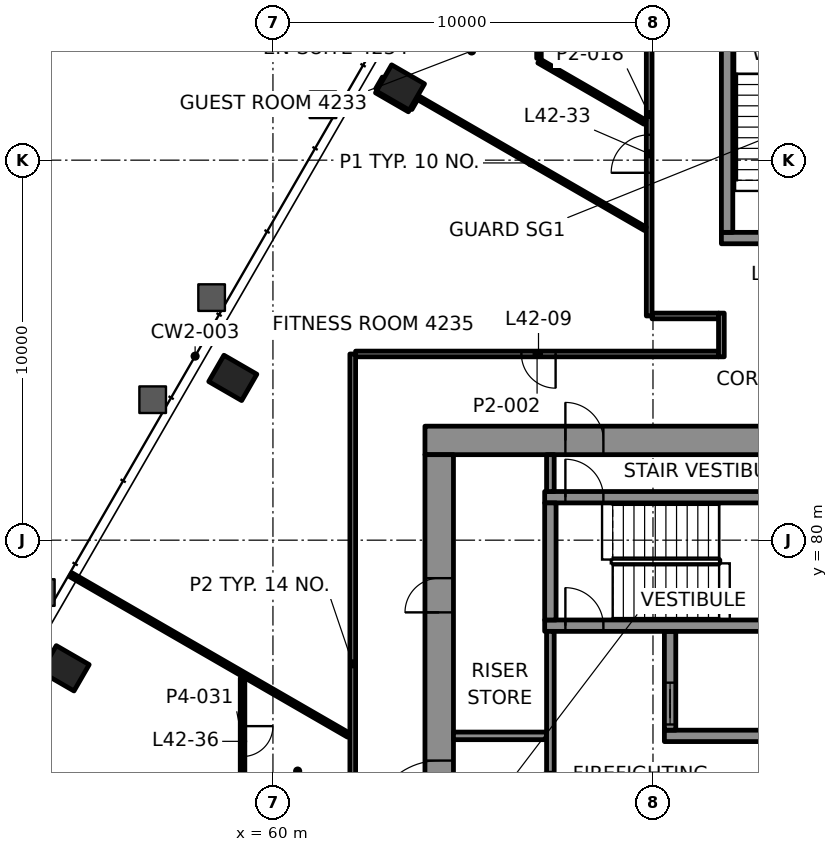
"""IFC4 building model, lengths in metres.
Left out: names, types, materials, properties, quantities, classifications, styles, units other than length and angle.
Written with IfcOpenShell. Run it as: python <this file> out.ifc"""

import sys

from ifc_helpers import new_model, si_unit, direction, frame, frame_2d, origin, origin_2d, place, context, subcontext, project, spatial, rectangle, hollow_rectangle, extrude, element, fill, save


model = new_model("IFC4")
c1 = context("Model", 3, precision=1e-05, world=origin(), true_north=direction((0.0, 1.0)))
c2 = subcontext(c1, "Body", "Model", "MODEL_VIEW")
j1 = project(units=[si_unit("LENGTHUNIT", "METRE"), si_unit("PLANEANGLEUNIT", "RADIAN")], contexts=[c1])
p1 = place(None, origin())
s1 = spatial("IfcSite", under=j1, at=p1, CompositionType="ELEMENT")
p2 = place(p1, origin())
s2 = spatial("IfcBuilding", under=s1, at=p2, CompositionType="ELEMENT")
p3 = place(p2, frame((0.0, 0.0, 183.1)))
s3 = spatial("IfcBuildingStorey", under=s2, at=p3, CompositionType="ELEMENT", Elevation=183.1)
for number, where, z_axis, x_axis in (
    (1, (63.355, 91.912, -0.0), (0.0, 0.0, 1.0), (-0.5, -0.866, 0.0)),
    (2, (58.944, 84.27, -0.0), (0.0, 0.0, 1.0), (-0.5, -0.866, 0.0)),
    (3, (54.532, 76.628, -0.0), (0.0, 0.0, 1.0), (-0.5, -0.866, 0.0)),
):
    element("IfcColumn", number, at=place(p3, frame(where, z_axis=z_axis, x_axis=x_axis)), inside=s3, PredefinedType="COLUMN", context=c2, shape_type="SweptSolid", body=[
        extrude(hollow_rectangle(XDim=0.8, YDim=1.0, WallThickness=0.05, at=origin_2d()), origin(), (0.0, 0.0, 1.0), 3.9),
    ])
p4 = place(p3, frame((64.0, 82.625, 0.0), z_axis=(0.0, 0.0, 1.0), x_axis=(1.0, 0.0, 0.0)))
e4 = element("IfcWall", 4, at=p4, inside=s3, PredefinedType="SHEAR", context=c2, shape_type="SweptSolid", body=[
    extrude(rectangle(XDim=22.0, YDim=0.75, at=frame_2d((11.0, 0.0))), origin(), (0.0, 0.0, 1.0), 3.7),
])
p5 = place(p4, frame((3.695, 0.0, 0.0)))
e5 = element("IfcOpeningElement", 5, at=p5, cuts=e4, PredefinedType="OPENING", context=c2, shape_type="SweptSolid", body=[
    extrude(rectangle(XDim=1.0, YDim=2.1, at=frame_2d((0.5, 1.05))), frame((0.0, 0.385, 0.0), z_axis=(0.0, -1.0, 0.0), x_axis=(1.0, 0.0, 0.0)), (0.0, 0.0, 1.0), 0.77),
])
p6 = place(p4, frame((17.505, 0.0, 0.0)))
e6 = element("IfcOpeningElement", 6, at=p6, cuts=e4, PredefinedType="OPENING", context=c2, shape_type="SweptSolid", body=[
    extrude(rectangle(XDim=1.0, YDim=2.1, at=frame_2d((0.5, 1.05))), frame((0.0, 0.385, 0.0), z_axis=(0.0, -1.0, 0.0), x_axis=(1.0, 0.0, 0.0)), (0.0, 0.0, 1.0), 0.77),
])
p7 = place(p4, frame((10.65, 0.0, 0.0)))
e7 = element("IfcOpeningElement", 7, at=p7, cuts=e4, PredefinedType="OPENING", context=c2, shape_type="SweptSolid", body=[
    extrude(rectangle(XDim=0.9, YDim=2.1, at=frame_2d((0.45, 1.05))), frame((0.0, 0.385, 0.0), z_axis=(0.0, -1.0, 0.0), x_axis=(1.0, 0.0, 0.0)), (0.0, 0.0, 1.0), 0.77),
])
p8 = place(p3, frame((64.375, 67.75, 0.0), z_axis=(0.0, 0.0, 1.0), x_axis=(0.0, 1.0, 0.0)))
e8 = element("IfcWall", 8, at=p8, inside=s3, PredefinedType="SHEAR", context=c2, shape_type="SweptSolid", body=[
    extrude(rectangle(XDim=14.5, YDim=0.75, at=frame_2d((7.25, 0.0))), origin(), (0.0, 0.0, 1.0), 3.7),
])
p9 = place(p8, frame((4.65, 0.0, 0.0)))
e9 = element("IfcOpeningElement", 9, at=p9, cuts=e8, PredefinedType="OPENING", context=c2, shape_type="SweptSolid", body=[
    extrude(rectangle(XDim=1.8, YDim=2.1, at=frame_2d((0.9, 1.05))), frame((0.0, 0.385, 0.0), z_axis=(0.0, -1.0, 0.0), x_axis=(1.0, 0.0, 0.0)), (0.0, 0.0, 1.0), 0.77),
])
p10 = place(p8, frame((2.55, 0.0, 0.0)))
e10 = element("IfcOpeningElement", 10, at=p10, cuts=e8, PredefinedType="OPENING", context=c2, shape_type="SweptSolid", body=[
    extrude(rectangle(XDim=0.9, YDim=2.1, at=frame_2d((0.45, 1.05))), frame((0.0, 0.385, 0.0), z_axis=(0.0, -1.0, 0.0), x_axis=(1.0, 0.0, 0.0)), (0.0, 0.0, 1.0), 0.77),
])
p11 = place(p8, frame((10.35, 0.0, 0.0)))
e11 = element("IfcOpeningElement", 11, at=p11, cuts=e8, PredefinedType="OPENING", context=c2, shape_type="SweptSolid", body=[
    extrude(rectangle(XDim=0.9, YDim=2.1, at=frame_2d((0.45, 1.05))), frame((0.0, 0.385, 0.0), z_axis=(0.0, -1.0, 0.0), x_axis=(1.0, 0.0, 0.0)), (0.0, 0.0, 1.0), 0.77),
])
p12 = place(p3, frame((70.3, 74.85, 0.0), z_axis=(0.0, 0.0, 1.0), x_axis=(1.0, 0.0, 0.0)))
e12 = element("IfcWall", 12, at=p12, inside=s3, PredefinedType="SHEAR", context=c2, shape_type="SweptSolid", body=[
    extrude(rectangle(XDim=14.3, YDim=0.3, at=frame_2d((7.15, 0.0))), origin(), (0.0, 0.0, 1.0), 3.7),
])
p13 = place(p12, frame((3.8, 0.0, 0.0)))
e13 = element("IfcOpeningElement", 13, at=p13, cuts=e12, PredefinedType="OPENING", context=c2, shape_type="SweptSolid", body=[
    extrude(rectangle(XDim=1.1, YDim=2.1, at=frame_2d((0.55, 1.05))), frame((0.0, 0.16, 0.0), z_axis=(0.0, -1.0, 0.0), x_axis=(1.0, 0.0, 0.0)), (0.0, 0.0, 1.0), 0.32),
])
p14 = place(p12, frame((12.2, 0.0, 0.0)))
e14 = element("IfcOpeningElement", 14, at=p14, cuts=e12, PredefinedType="OPENING", context=c2, shape_type="SweptSolid", body=[
    extrude(rectangle(XDim=1.1, YDim=2.1, at=frame_2d((0.55, 1.05))), frame((0.0, 0.16, 0.0), z_axis=(0.0, -1.0, 0.0), x_axis=(1.0, 0.0, 0.0)), (0.0, 0.0, 1.0), 0.32),
])
p15 = place(p3, frame((70.45, 75.0, 0.0), z_axis=(0.0, 0.0, 1.0), x_axis=(0.0, 1.0, 0.0)))
e15 = element("IfcWall", 15, at=p15, inside=s3, PredefinedType="SHEAR", context=c2, shape_type="SweptSolid", body=[
    extrude(rectangle(XDim=2.6, YDim=0.3, at=frame_2d((1.3, 0.0))), origin(), (0.0, 0.0, 1.0), 3.7),
])
p16 = place(p15, frame((0.15, 0.0, 0.0)))
e16 = element("IfcOpeningElement", 16, at=p16, cuts=e15, PredefinedType="OPENING", context=c2, shape_type="SweptSolid", body=[
    extrude(rectangle(XDim=1.1, YDim=2.1, at=frame_2d((0.55, 1.05))), frame((0.0, 0.16, 0.0), z_axis=(0.0, -1.0, 0.0), x_axis=(1.0, 0.0, 0.0)), (0.0, 0.0, 1.0), 0.32),
])
p17 = place(p3, frame((67.15, 77.75, 0.0), z_axis=(0.0, 0.0, 1.0), x_axis=(1.0, 0.0, 0.0)))
e17 = element("IfcWall", 17, at=p17, inside=s3, PredefinedType="SHEAR", context=c2, shape_type="SweptSolid", body=[
    extrude(rectangle(XDim=17.45, YDim=0.3, at=frame_2d((8.725, 0.0))), origin(), (0.0, 0.0, 1.0), 3.7),
])
p18 = place(p17, frame((0.545, 0.0, 0.0)))
e18 = element("IfcOpeningElement", 18, at=p18, cuts=e17, PredefinedType="OPENING", context=c2, shape_type="SweptSolid", body=[
    extrude(rectangle(XDim=1.0, YDim=2.1, at=frame_2d((0.5, 1.05))), frame((0.0, 0.16, 0.0), z_axis=(0.0, -1.0, 0.0), x_axis=(1.0, 0.0, 0.0)), (0.0, 0.0, 1.0), 0.32),
])
p19 = place(p3, frame((67.15, 81.13, 0.0), z_axis=(0.0, 0.0, 1.0), x_axis=(1.0, 0.0, 0.0)))
e19 = element("IfcWall", 19, at=p19, inside=s3, PredefinedType="SHEAR", context=c2, shape_type="SweptSolid", body=[
    extrude(rectangle(XDim=6.91, YDim=0.3, at=frame_2d((3.455, 0.0))), origin(), (0.0, 0.0, 1.0), 3.7),
])
p20 = place(p19, frame((0.545, 0.0, 0.0)))
e20 = element("IfcOpeningElement", 20, at=p20, cuts=e19, PredefinedType="OPENING", context=c2, shape_type="SweptSolid", body=[
    extrude(rectangle(XDim=1.0, YDim=2.1, at=frame_2d((0.5, 1.05))), frame((0.0, 0.16, 0.0), z_axis=(0.0, -1.0, 0.0), x_axis=(1.0, 0.0, 0.0)), (0.0, 0.0, 1.0), 0.32),
])
p21 = place(p3, frame((67.3, 77.9, 0.0), z_axis=(0.0, 0.0, 1.0), x_axis=(0.0, 1.0, 0.0)))
e21 = element("IfcWall", 21, at=p21, inside=s3, PredefinedType="SHEAR", context=c2, shape_type="SweptSolid", body=[
    extrude(rectangle(XDim=3.08, YDim=0.3, at=frame_2d((1.54, 0.0))), origin(), (0.0, 0.0, 1.0), 3.7),
])
p22 = place(p3, frame((71.8, 87.95, 0.0), z_axis=(0.0, 0.0, 1.0), x_axis=(1.0, 0.0, 0.0)))
e22 = element("IfcWall", 22, at=p22, inside=s3, PredefinedType="SHEAR", context=c2, shape_type="SweptSolid", body=[
    extrude(rectangle(XDim=6.4, YDim=0.3, at=frame_2d((3.2, 0.0))), origin(), (0.0, 0.0, 1.0), 3.7),
])
p23 = place(p22, frame((1.325, 0.0, 0.0)))
e23 = element("IfcOpeningElement", 23, at=p23, cuts=e22, PredefinedType="OPENING", context=c2, shape_type="SweptSolid", body=[
    extrude(rectangle(XDim=1.0, YDim=2.1, at=frame_2d((0.5, 1.05))), frame((0.0, 0.16, 0.0), z_axis=(0.0, -1.0, 0.0), x_axis=(1.0, 0.0, 0.0)), (0.0, 0.0, 1.0), 0.32),
])
p24 = place(p22, frame((4.125, 0.0, 0.0)))
e24 = element("IfcOpeningElement", 24, at=p24, cuts=e22, PredefinedType="OPENING", context=c2, shape_type="SweptSolid", body=[
    extrude(rectangle(XDim=1.2, YDim=2.1, at=frame_2d((0.6, 1.05))), frame((0.0, 0.16, 0.0), z_axis=(0.0, -1.0, 0.0), x_axis=(1.0, 0.0, 0.0)), (0.0, 0.0, 1.0), 0.32),
])
p25 = place(p3, frame((71.95, 88.1, 0.0), z_axis=(0.0, 0.0, 1.0), x_axis=(0.0, 1.0, 0.0)))
e25 = element("IfcWall", 25, at=p25, inside=s3, PredefinedType="SHEAR", context=c2, shape_type="SweptSolid", body=[
    extrude(rectangle(XDim=6.2, YDim=0.3, at=frame_2d((3.1, 0.0))), origin(), (0.0, 0.0, 1.0), 3.7),
])
p26 = place(p3, frame((71.725, 84.9, 0.0), z_axis=(0.0, 0.0, 1.0), x_axis=(-1.0, 0.0, 0.0)))
e26 = element("IfcWall", 26, at=p26, inside=s3, PredefinedType="PARTITIONING", context=c2, shape_type="SweptSolid", body=[
    extrude(rectangle(XDim=9.55, YDim=0.15, at=frame_2d((4.775, 0.0))), origin(), (0.0, 0.0, 1.0), 3.1),
])
p27 = place(p26, frame((4.287, 0.0, 0.0)))
e27 = element("IfcOpeningElement", 27, at=p27, cuts=e26, PredefinedType="OPENING", context=c2, shape_type="SweptSolid", body=[
    extrude(rectangle(XDim=0.9, YDim=2.1, at=frame_2d((0.45, 1.05))), frame((0.0, 0.085, 0.0), z_axis=(0.0, -1.0, 0.0), x_axis=(1.0, 0.0, 0.0)), (0.0, 0.0, 1.0), 0.17),
])
p28 = place(p3, frame((69.976, 85.9, 0.0), z_axis=(0.0, 0.0, 1.0), x_axis=(1.0, 0.0, 0.0)))
e28 = element("IfcWall", 28, at=p28, inside=s3, PredefinedType="PARTITIONING", context=c2, shape_type="SweptSolid", body=[
    extrude(rectangle(XDim=1.75, YDim=0.15, at=frame_2d((0.875, 0.0))), origin(), (0.0, 0.0, 1.0), 3.1),
])
p29 = place(p3, frame((63.614, 91.359, 0.0), z_axis=(0.0, 0.0, 1.0), x_axis=(0.499557828523, 0.866280541142, 0.0)))
e29 = element("IfcWall", 29, at=p29, inside=s3, PredefinedType="PARTITIONING", context=c2, shape_type="SweptSolid", body=[
    extrude(rectangle(XDim=0.3, YDim=0.1, at=frame_2d((0.15, 0.0))), origin(), (0.0, 0.0, 1.0), 3.022),
])
p30 = place(p3, frame((62.748, 91.859, 0.0), z_axis=(0.0, 0.0, 1.0), x_axis=(0.500044870432, 0.865999496279, 0.0)))
e30 = element("IfcWall", 30, at=p30, inside=s3, PredefinedType="PARTITIONING", context=c2, shape_type="SweptSolid", body=[
    extrude(rectangle(XDim=0.35, YDim=0.1, at=frame_2d((0.175, 0.0))), origin(), (0.0, 0.0, 1.0), 3.1),
])
p31 = place(p3, frame((71.8, 84.825, 0.0), z_axis=(0.0, 0.0, 1.0), x_axis=(0.0, 1.0, 0.0)))
e31 = element("IfcWall", 31, at=p31, inside=s3, PredefinedType="PARTITIONING", context=c2, shape_type="SweptSolid", body=[
    extrude(rectangle(XDim=1.15, YDim=0.15, at=frame_2d((0.575, 0.0))), origin(), (0.0, 0.0, 1.0), 3.1),
])
p32 = place(p3, frame((69.9, 85.9, 0.0), z_axis=(0.0, 0.0, 1.0), x_axis=(0.0, 1.0, 0.0)))
e32 = element("IfcWall", 32, at=p32, inside=s3, PredefinedType="PARTITIONING", context=c2, shape_type="SweptSolid", body=[
    extrude(rectangle(XDim=10.6, YDim=0.15, at=frame_2d((5.3, 0.0))), origin(), (0.0, 0.0, 1.0), 3.022),
])
p33 = place(p32, frame((3.767, 0.0, 0.0)))
e33 = element("IfcOpeningElement", 33, at=p33, cuts=e32, PredefinedType="OPENING", context=c2, shape_type="SweptSolid", body=[
    extrude(rectangle(XDim=1.0, YDim=2.1, at=frame_2d((0.5, 1.05))), frame((0.0, 0.085, 0.0), z_axis=(0.0, -1.0, 0.0), x_axis=(1.0, 0.0, 0.0)), (0.0, 0.0, 1.0), 0.17),
])
p34 = place(p32, frame((8.412, 0.0, 0.0)))
e34 = element("IfcOpeningElement", 34, at=p34, cuts=e32, PredefinedType="OPENING", context=c2, shape_type="SweptSolid", body=[
    extrude(rectangle(XDim=0.9, YDim=2.1, at=frame_2d((0.45, 1.05))), frame((0.0, 0.085, 0.0), z_axis=(0.0, -1.0, 0.0), x_axis=(1.0, 0.0, 0.0)), (0.0, 0.0, 1.0), 0.17),
])
p35 = place(p3, frame((67.0, 94.747, 0.0), z_axis=(0.0, 0.0, 1.0), x_axis=(0.0, -1.0, 0.0)))
e35 = element("IfcWall", 35, at=p35, inside=s3, PredefinedType="PARTITIONING", context=c2, shape_type="SweptSolid", body=[
    extrude(rectangle(XDim=2.068, YDim=0.12, at=frame_2d((1.034, 0.0))), origin(), (0.0, 0.0, 1.0), 3.1),
])
p36 = place(p35, frame((0.634, 0.0, 0.0)))
e36 = element("IfcOpeningElement", 36, at=p36, cuts=e35, PredefinedType="OPENING", context=c2, shape_type="SweptSolid", body=[
    extrude(rectangle(XDim=0.8, YDim=2.1, at=frame_2d((0.4, 1.05))), frame((0.0, 0.07, 0.0), z_axis=(0.0, -1.0, 0.0), x_axis=(1.0, 0.0, 0.0)), (0.0, 0.0, 1.0), 0.14),
])
p37 = place(p3, frame((62.1, 68.591, 0.0), z_axis=(0.0, 0.0, 1.0), x_axis=(0.0, 1.0, 0.0)))
e37 = element("IfcWall", 37, at=p37, inside=s3, PredefinedType="PARTITIONING", context=c2, shape_type="SweptSolid", body=[
    extrude(rectangle(XDim=16.308, YDim=0.15, at=frame_2d((8.154, 0.0))), origin(), (0.0, 0.0, 1.0), 3.1),
])
p38 = place(p3, frame((59.2, 76.371, 0.0), z_axis=(0.0, 0.0, 1.0), x_axis=(0.0, -1.0, 0.0)))
e38 = element("IfcWall", 38, at=p38, inside=s3, PredefinedType="PARTITIONING", context=c2, shape_type="SweptSolid", body=[
    extrude(rectangle(XDim=3.329, YDim=0.12, at=frame_2d((1.665, 0.0))), origin(), (0.0, 0.0, 1.0), 3.1),
])
p39 = place(p38, frame((1.265, 0.0, 0.0)))
e39 = element("IfcOpeningElement", 39, at=p39, cuts=e38, PredefinedType="OPENING", context=c2, shape_type="SweptSolid", body=[
    extrude(rectangle(XDim=0.8, YDim=2.1, at=frame_2d((0.4, 1.05))), frame((0.0, 0.07, 0.0), z_axis=(0.0, -1.0, 0.0), x_axis=(1.0, 0.0, 0.0)), (0.0, 0.0, 1.0), 0.14),
])
p40 = place(p3, frame((69.79, 90.998, 0.0), z_axis=(0.0, 0.0, 1.0), x_axis=(-0.866029130051, 0.499993545862, 0.0)))
e40 = element("IfcWall", 40, at=p40, inside=s3, PredefinedType="PARTITIONING", context=c2, shape_type="SweptSolid", body=[
    extrude(rectangle(XDim=3.222, YDim=0.12, at=frame_2d((1.611, 0.0))), origin(), (0.0, 0.0, 1.0), 3.1),
])
p41 = place(p3, frame((69.799, 88.192, 0.0), z_axis=(0.0, 0.0, 1.0), x_axis=(-0.866013353477, 0.500020871164, 0.0)))
e41 = element("IfcWall", 41, at=p41, inside=s3, PredefinedType="PARTITIONING", context=c2, shape_type="SweptSolid", body=[
    extrude(rectangle(XDim=6.94, YDim=0.1, at=frame_2d((3.47, 0.0))), origin(), (0.0, 0.0, 1.0), 3.022),
])
p42 = place(p3, frame((63.588, 91.316, 0.0), z_axis=(0.0, 0.0, 1.0), x_axis=(-0.866039090965, 0.499976292358, 0.0)))
e42 = element("IfcWall", 42, at=p42, inside=s3, PredefinedType="PARTITIONING", context=c2, shape_type="SweptSolid", body=[
    extrude(rectangle(XDim=0.999, YDim=0.1, at=frame_2d((0.5, 0.0))), origin(), (0.0, 0.0, 1.0), 3.022),
])
p43 = place(p3, frame((61.99, 74.869, 0.0), z_axis=(0.0, 0.0, 1.0), x_axis=(-0.866017924271, 0.500012954673, 0.0)))
e43 = element("IfcWall", 43, at=p43, inside=s3, PredefinedType="PARTITIONING", context=c2, shape_type="SweptSolid", body=[
    extrude(rectangle(XDim=8.439, YDim=0.12, at=frame_2d((4.219, 0.0))), origin(), (0.0, 0.0, 1.0), 3.022),
])
p44 = place(p3, frame((64.75, 74.85, 0.0), z_axis=(0.0, 0.0, 1.0), x_axis=(1.0, 0.0, 0.0)))
e44 = element("IfcWall", 44, at=p44, inside=s3, PredefinedType="PARTITIONING", context=c2, shape_type="SweptSolid", body=[
    extrude(rectangle(XDim=2.45, YDim=0.2, at=frame_2d((1.225, 0.0))), origin(), (0.0, 0.0, 1.0), 3.7),
])
p45 = place(p3, frame((67.3, 71.85, 0.0), z_axis=(0.0, 0.0, 1.0), x_axis=(0.0, 1.0, 0.0)))
e45 = element("IfcWall", 45, at=p45, inside=s3, PredefinedType="PARTITIONING", context=c2, shape_type="SweptSolid", body=[
    extrude(rectangle(XDim=5.75, YDim=0.2, at=frame_2d((2.875, 0.0))), origin(), (0.0, 0.0, 1.0), 3.7),
])
p46 = place(p45, frame((0.85, 0.0, 0.0)))
e46 = element("IfcOpeningElement", 46, at=p46, cuts=e45, PredefinedType="OPENING", context=c2, shape_type="SweptSolid", body=[
    extrude(rectangle(XDim=1.2, YDim=2.1, at=frame_2d((0.6, 1.05))), frame((0.0, 0.11, 0.0), z_axis=(0.0, -1.0, 0.0), x_axis=(1.0, 0.0, 0.0)), (0.0, 0.0, 1.0), 0.22),
])
p47 = place(p3, frame((67.3, 81.28, 0.0), z_axis=(0.0, 0.0, 1.0), x_axis=(0.0, 1.0, 0.0)))
e47 = element("IfcWall", 47, at=p47, inside=s3, PredefinedType="PARTITIONING", context=c2, shape_type="SweptSolid", body=[
    extrude(rectangle(XDim=0.97, YDim=0.2, at=frame_2d((0.485, 0.0))), origin(), (0.0, 0.0, 1.0), 3.7),
])
p48 = place(p27, origin())
e48 = element("IfcDoor", 48, at=p48, inside=s3, OperationType="SINGLE_SWING_LEFT", PredefinedType="DOOR", context=c2, shape_type="SweptSolid", body=[
    extrude(rectangle(XDim=0.9, YDim=2.1, at=frame_2d((0.45, 1.05))), frame((0.0, 0.025, 0.0), z_axis=(0.0, -1.0, 0.0), x_axis=(1.0, 0.0, 0.0)), (0.0, 0.0, 1.0), 0.05),
])
fill(e27, e48)
p49 = place(p33, origin())
e49 = element("IfcDoor", 49, at=p49, inside=s3, OperationType="SINGLE_SWING_RIGHT", PredefinedType="DOOR", context=c2, shape_type="SweptSolid", body=[
    extrude(rectangle(XDim=1.0, YDim=2.1, at=frame_2d((0.5, 1.05))), frame((0.0, 0.025, 0.0), z_axis=(0.0, -1.0, 0.0), x_axis=(1.0, 0.0, 0.0)), (0.0, 0.0, 1.0), 0.05),
])
fill(e33, e49)
p50 = place(p39, origin())
e50 = element("IfcDoor", 50, at=p50, inside=s3, OperationType="SINGLE_SWING_LEFT", PredefinedType="DOOR", context=c2, shape_type="SweptSolid", body=[
    extrude(rectangle(XDim=0.8, YDim=2.1, at=frame_2d((0.4, 1.05))), frame((0.0, 0.025, 0.0), z_axis=(0.0, -1.0, 0.0), x_axis=(1.0, 0.0, 0.0)), (0.0, 0.0, 1.0), 0.05),
])
fill(e39, e50)
p51 = place(p16, origin())
e51 = element("IfcDoor", 51, at=p51, inside=s3, OperationType="DOUBLE_DOOR_SLIDING", PredefinedType="DOOR", context=c2, shape_type="SweptSolid", body=[
    extrude(rectangle(XDim=1.1, YDim=2.1, at=frame_2d((0.55, 1.05))), frame((0.0, 0.025, 0.0), z_axis=(0.0, -1.0, 0.0), x_axis=(1.0, 0.0, 0.0)), (0.0, 0.0, 1.0), 0.05),
])
fill(e16, e51)
p52 = place(p18, origin())
e52 = element("IfcDoor", 52, at=p52, inside=s3, OperationType="SINGLE_SWING_LEFT", PredefinedType="DOOR", context=c2, shape_type="SweptSolid", body=[
    extrude(rectangle(XDim=1.0, YDim=2.1, at=frame_2d((0.5, 1.05))), frame((0.0, 0.025, 0.0), z_axis=(0.0, -1.0, 0.0), x_axis=(1.0, 0.0, 0.0)), (0.0, 0.0, 1.0), 0.05),
])
fill(e18, e52)
p53 = place(p20, origin())
e53 = element("IfcDoor", 53, at=p53, inside=s3, OperationType="SINGLE_SWING_RIGHT", PredefinedType="DOOR", context=c2, shape_type="SweptSolid", body=[
    extrude(rectangle(XDim=1.0, YDim=2.1, at=frame_2d((0.5, 1.05))), frame((0.0, 0.025, 0.0), z_axis=(0.0, -1.0, 0.0), x_axis=(1.0, 0.0, 0.0)), (0.0, 0.0, 1.0), 0.05),
])
fill(e20, e53)
p54 = place(p5, origin())
e54 = element("IfcDoor", 54, at=p54, inside=s3, OperationType="SINGLE_SWING_LEFT", PredefinedType="DOOR", context=c2, shape_type="SweptSolid", body=[
    extrude(rectangle(XDim=1.0, YDim=2.1, at=frame_2d((0.5, 1.05))), frame((0.0, 0.095, 0.0), z_axis=(0.0, -1.0, 0.0), x_axis=(1.0, 0.0, 0.0)), (0.0, 0.0, 1.0), 0.19),
])
fill(e5, e54)
p55 = place(p46, origin())
e55 = element("IfcDoor", 55, at=p55, inside=s3, OperationType="SINGLE_SWING_RIGHT", PredefinedType="DOOR", context=c2, shape_type="SweptSolid", body=[
    extrude(rectangle(XDim=1.2, YDim=2.1, at=frame_2d((0.6, 1.05))), frame((0.0, 0.025, 0.0), z_axis=(0.0, -1.0, 0.0), x_axis=(1.0, 0.0, 0.0)), (0.0, 0.0, 1.0), 0.05),
])
fill(e46, e55)
p56 = place(p9, origin())
e56 = element("IfcDoor", 56, at=p56, inside=s3, OperationType="SINGLE_SWING_LEFT", PredefinedType="DOOR", context=c2, shape_type="SweptSolid", body=[
    extrude(rectangle(XDim=1.8, YDim=2.1, at=frame_2d((0.9, 1.05))), frame((0.0, 0.095, 0.0), z_axis=(0.0, -1.0, 0.0), x_axis=(1.0, 0.0, 0.0)), (0.0, 0.0, 1.0), 0.19),
])
fill(e9, e56)
p57 = place(p11, origin())
e57 = element("IfcDoor", 57, at=p57, inside=s3, OperationType="SINGLE_SWING_RIGHT", PredefinedType="DOOR", context=c2, shape_type="SweptSolid", body=[
    extrude(rectangle(XDim=0.9, YDim=2.1, at=frame_2d((0.45, 1.05))), frame((0.0, 0.095, 0.0), z_axis=(0.0, -1.0, 0.0), x_axis=(1.0, 0.0, 0.0)), (0.0, 0.0, 1.0), 0.19),
])
fill(e11, e57)
save(model, sys.argv[1])
